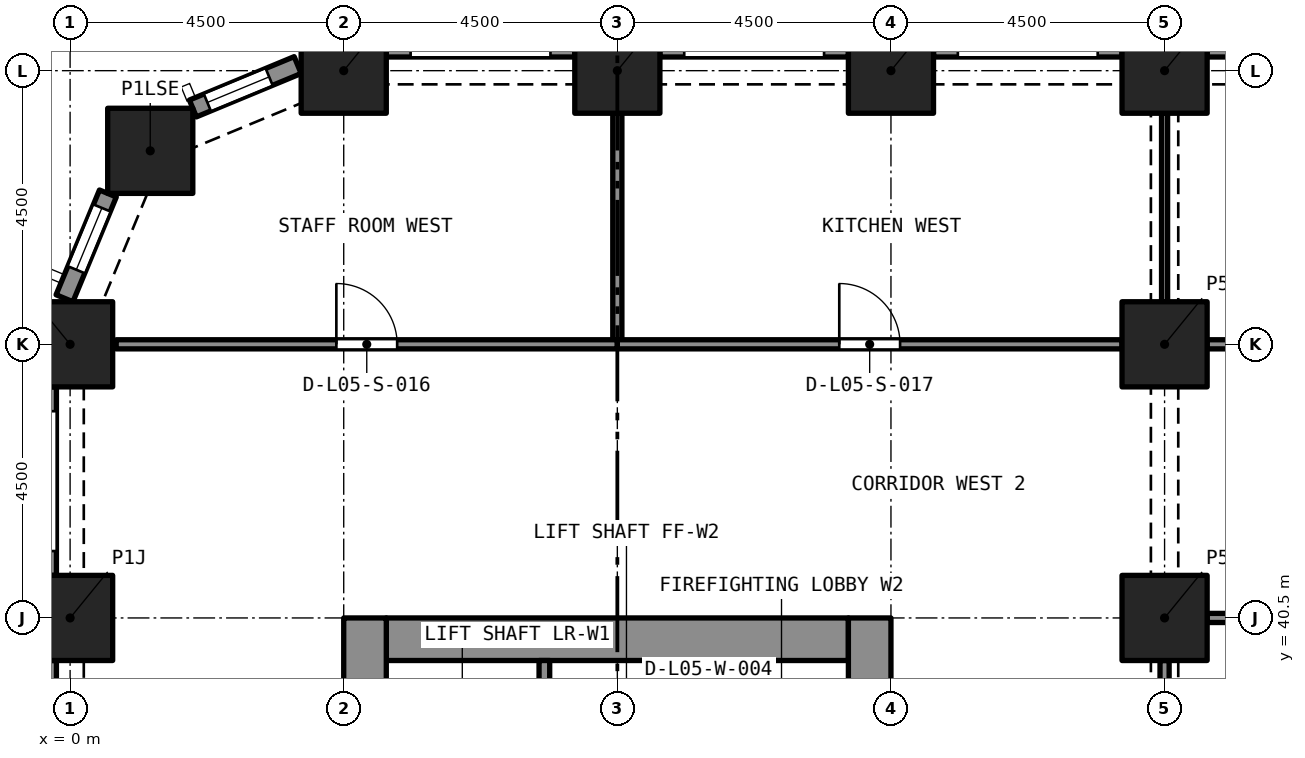
"""IFC4 building model, lengths in metres.
Left out: names, types, materials, properties, quantities, classifications, styles, units other than length and angle.
Written with IfcOpenShell. Run it as: python <this file> out.ifc"""

import sys

from ifc_helpers import new_model, si_unit, direction, frame, frame_2d, origin, origin_2d, place, context, subcontext, project, spatial, rectangle, extrude, element, fill, save


model = new_model("IFC4")
c1 = context("Model", 3, precision=1e-05, world=origin(), true_north=direction((0.0, 1.0)))
c2 = subcontext(c1, "Body", "Model", "MODEL_VIEW")
j1 = project(units=[si_unit("LENGTHUNIT", "METRE"), si_unit("PLANEANGLEUNIT", "RADIAN")], contexts=[c1])
p1 = place(None, origin())
s1 = spatial("IfcSite", under=j1, at=p1, CompositionType="ELEMENT")
p2 = place(p1, origin())
s2 = spatial("IfcBuilding", under=s1, at=p2, CompositionType="ELEMENT")
p3 = place(p2, frame((0.0, 0.0, 26.0)))
s3 = spatial("IfcBuildingStorey", under=s2, at=p3, CompositionType="ELEMENT", Elevation=26.0)
for number, where, z_axis, x_axis in (
    (1, (0.0, 40.5, 0.0), (0.0, 0.0, 1.0), (1.0, 0.0, 0.0)),
    (2, (18.0, 40.5, 0.0), (0.0, 0.0, 1.0), (1.0, 0.0, 0.0)),
    (3, (0.0, 45.0, 0.0), (0.0, 0.0, 1.0), (1.0, 0.0, 0.0)),
    (4, (18.0, 45.0, 0.0), (0.0, 0.0, 1.0), (1.0, 0.0, 0.0)),
    (5, (1.318, 48.182, 0.0), (0.0, 0.0, 1.0), (1.0, 0.0, 0.0)),
    (6, (4.5, 49.5, 0.0), (0.0, 0.0, 1.0), (1.0, 0.0, 0.0)),
    (7, (9.0, 49.5, 0.0), (0.0, 0.0, 1.0), (1.0, 0.0, 0.0)),
    (8, (13.5, 49.5, 0.0), (0.0, 0.0, 1.0), (1.0, 0.0, 0.0)),
    (9, (18.0, 49.5, 0.0), (0.0, 0.0, 1.0), (1.0, 0.0, 0.0)),
):
    element("IfcColumn", number, at=place(p3, frame(where, z_axis=z_axis, x_axis=x_axis)), inside=s3, PredefinedType="COLUMN", context=c2, shape_type="SweptSolid", body=[
        extrude(rectangle(XDim=1.4, YDim=1.4, at=origin_2d()), origin(), (0.0, 0.0, 1.0), 4.4),
    ])
p4 = place(p3, frame((5.2, 40.15, 0.0), z_axis=(0.0, 0.0, 1.0), x_axis=(1.0, 0.0, 0.0)))
e10 = element("IfcWall", 10, at=p4, inside=s3, PredefinedType="SOLIDWALL", context=c2, shape_type="SweptSolid", body=[
    extrude(rectangle(XDim=7.6, YDim=0.7, at=frame_2d((3.8, 0.0))), origin(), (0.0, 0.0, 1.0), 4.4),
])
p5 = place(p3, frame((4.85, 27.0, 0.0), z_axis=(0.0, 0.0, 1.0), x_axis=(0.0, 1.0, 0.0)))
e11 = element("IfcWall", 11, at=p5, inside=s3, PredefinedType="SOLIDWALL", context=c2, shape_type="SweptSolid", body=[
    extrude(rectangle(XDim=13.5, YDim=0.7, at=frame_2d((6.75, 0.0))), origin(), (0.0, 0.0, 1.0), 4.4),
])
p6 = place(p5, frame((8.95, 0.0, 0.0)))
e12 = element("IfcOpeningElement", 12, at=p6, cuts=e11, PredefinedType="OPENING", context=c2, shape_type="SweptSolid", body=[
    extrude(rectangle(XDim=1.2, YDim=2.1, at=frame_2d((0.6, 1.05))), frame((0.0, 0.36, 0.0), z_axis=(0.0, -1.0, 0.0), x_axis=(1.0, 0.0, 0.0)), (0.0, 0.0, 1.0), 0.72),
])
p7 = place(p3, frame((13.15, 27.0, 0.0), z_axis=(0.0, 0.0, 1.0), x_axis=(0.0, 1.0, 0.0)))
e13 = element("IfcWall", 13, at=p7, inside=s3, PredefinedType="SOLIDWALL", context=c2, shape_type="SweptSolid", body=[
    extrude(rectangle(XDim=13.5, YDim=0.7, at=frame_2d((6.75, 0.0))), origin(), (0.0, 0.0, 1.0), 4.4),
])
p8 = place(p7, frame((11.1, 0.0, 0.0)))
e14 = element("IfcOpeningElement", 14, at=p8, cuts=e13, PredefinedType="OPENING", context=c2, shape_type="SweptSolid", body=[
    extrude(rectangle(XDim=1.1, YDim=2.1, at=frame_2d((0.55, 1.05))), frame((0.0, 0.36, 0.0), z_axis=(0.0, -1.0, 0.0), x_axis=(1.0, 0.0, 0.0)), (0.0, 0.0, 1.0), 0.72),
])
p9 = place(p7, frame((8.95, 0.0, 0.0)))
e15 = element("IfcOpeningElement", 15, at=p9, cuts=e13, PredefinedType="OPENING", context=c2, shape_type="SweptSolid", body=[
    extrude(rectangle(XDim=1.2, YDim=2.1, at=frame_2d((0.6, 1.05))), frame((0.0, 0.36, 0.0), z_axis=(0.0, -1.0, 0.0), x_axis=(1.0, 0.0, 0.0)), (0.0, 0.0, 1.0), 0.72),
])
p10 = place(p3, frame((18.7, 49.875, 0.0), z_axis=(0.0, 0.0, 1.0), x_axis=(1.0, 0.0, 0.0)))
e16 = element("IfcWall", 16, at=p10, inside=s3, PredefinedType="SOLIDWALL", context=c2, shape_type="SweptSolid", body=[
    extrude(rectangle(XDim=3.1, YDim=0.3, at=frame_2d((1.55, 0.0))), origin(), (0.0, 0.0, 1.0), 4.4),
])
p11 = place(p10, frame((0.4, 0.0, 0.45)))
e17 = element("IfcOpeningElement", 17, at=p11, cuts=e16, PredefinedType="OPENING", context=c2, shape_type="SweptSolid", body=[
    extrude(rectangle(XDim=2.3, YDim=2.55, at=frame_2d((1.15, 1.275))), frame((0.0, 0.16, 0.0), z_axis=(0.0, -1.0, 0.0), x_axis=(1.0, 0.0, 0.0)), (0.0, 0.0, 1.0), 0.32),
])
p12 = place(p3, frame((14.2, 49.875, 0.0), z_axis=(0.0, 0.0, 1.0), x_axis=(1.0, 0.0, 0.0)))
e18 = element("IfcWall", 18, at=p12, inside=s3, PredefinedType="SOLIDWALL", context=c2, shape_type="SweptSolid", body=[
    extrude(rectangle(XDim=3.1, YDim=0.3, at=frame_2d((1.55, 0.0))), origin(), (0.0, 0.0, 1.0), 4.4),
])
p13 = place(p12, frame((0.4, 0.0, 0.45)))
e19 = element("IfcOpeningElement", 19, at=p13, cuts=e18, PredefinedType="OPENING", context=c2, shape_type="SweptSolid", body=[
    extrude(rectangle(XDim=2.3, YDim=2.55, at=frame_2d((1.15, 1.275))), frame((0.0, 0.16, 0.0), z_axis=(0.0, -1.0, 0.0), x_axis=(1.0, 0.0, 0.0)), (0.0, 0.0, 1.0), 0.32),
])
p14 = place(p3, frame((9.7, 49.875, 0.0), z_axis=(0.0, 0.0, 1.0), x_axis=(1.0, 0.0, 0.0)))
e20 = element("IfcWall", 20, at=p14, inside=s3, PredefinedType="SOLIDWALL", context=c2, shape_type="SweptSolid", body=[
    extrude(rectangle(XDim=3.1, YDim=0.3, at=frame_2d((1.55, 0.0))), origin(), (0.0, 0.0, 1.0), 4.4),
])
p15 = place(p14, frame((0.4, 0.0, 0.45)))
e21 = element("IfcOpeningElement", 21, at=p15, cuts=e20, PredefinedType="OPENING", context=c2, shape_type="SweptSolid", body=[
    extrude(rectangle(XDim=2.3, YDim=2.55, at=frame_2d((1.15, 1.275))), frame((0.0, 0.16, 0.0), z_axis=(0.0, -1.0, 0.0), x_axis=(1.0, 0.0, 0.0)), (0.0, 0.0, 1.0), 0.32),
])
p16 = place(p3, frame((5.2, 49.875, 0.0), z_axis=(0.0, 0.0, 1.0), x_axis=(1.0, 0.0, 0.0)))
e22 = element("IfcWall", 22, at=p16, inside=s3, PredefinedType="SOLIDWALL", context=c2, shape_type="SweptSolid", body=[
    extrude(rectangle(XDim=3.1, YDim=0.3, at=frame_2d((1.55, 0.0))), origin(), (0.0, 0.0, 1.0), 4.4),
])
p17 = place(p16, frame((0.4, 0.0, 0.45)))
e23 = element("IfcOpeningElement", 23, at=p17, cuts=e22, PredefinedType="OPENING", context=c2, shape_type="SweptSolid", body=[
    extrude(rectangle(XDim=2.3, YDim=2.55, at=frame_2d((1.15, 1.275))), frame((0.0, 0.16, 0.0), z_axis=(0.0, -1.0, 0.0), x_axis=(1.0, 0.0, 0.0)), (0.0, 0.0, 1.0), 0.32),
])
p18 = place(p3, frame((2.02, 48.878, 0.0), z_axis=(0.0, 0.0, 1.0), x_axis=(0.923903565336, 0.38262540684, 0.0)))
e24 = element("IfcWall", 24, at=p18, inside=s3, PredefinedType="SOLIDWALL", context=c2, shape_type="SweptSolid", body=[
    extrude(rectangle(XDim=1.865, YDim=0.3, at=frame_2d((0.933, 0.0))), origin(), (0.0, 0.0, 1.0), 4.4),
])
p19 = place(p18, frame((0.258, 0.0, 0.45)))
e25 = element("IfcOpeningElement", 25, at=p19, cuts=e24, PredefinedType="OPENING", context=c2, shape_type="SweptSolid", body=[
    extrude(rectangle(XDim=1.1, YDim=2.55, at=frame_2d((0.55, 1.275))), frame((0.0, 0.16, 0.0), z_axis=(0.0, -1.0, 0.0), x_axis=(1.0, 0.0, 0.0)), (0.0, 0.0, 1.0), 0.32),
])
p20 = place(p3, frame((-0.092, 45.757, 0.0), z_axis=(0.0, 0.0, 1.0), x_axis=(0.382737135771, 0.923857286003, 0.0)))
e26 = element("IfcWall", 26, at=p20, inside=s3, PredefinedType="SOLIDWALL", context=c2, shape_type="SweptSolid", body=[
    extrude(rectangle(XDim=1.865, YDim=0.3, at=frame_2d((0.933, 0.0))), origin(), (0.0, 0.0, 1.0), 4.4),
])
p21 = place(p20, frame((0.508, 0.0, 0.45)))
e27 = element("IfcOpeningElement", 27, at=p21, cuts=e26, PredefinedType="OPENING", context=c2, shape_type="SweptSolid", body=[
    extrude(rectangle(XDim=1.1, YDim=2.55, at=frame_2d((0.55, 1.275))), frame((0.0, 0.16, 0.0), z_axis=(0.0, -1.0, 0.0), x_axis=(1.0, 0.0, 0.0)), (0.0, 0.0, 1.0), 0.32),
])
p22 = place(p3, frame((-0.375, 41.2, 0.0), z_axis=(0.0, 0.0, 1.0), x_axis=(0.0, 1.0, 0.0)))
e28 = element("IfcWall", 28, at=p22, inside=s3, PredefinedType="SOLIDWALL", context=c2, shape_type="SweptSolid", body=[
    extrude(rectangle(XDim=3.1, YDim=0.3, at=frame_2d((1.55, 0.0))), origin(), (0.0, 0.0, 1.0), 4.4),
])
p23 = place(p22, frame((0.4, 0.0, 0.45)))
e29 = element("IfcOpeningElement", 29, at=p23, cuts=e28, PredefinedType="OPENING", context=c2, shape_type="SweptSolid", body=[
    extrude(rectangle(XDim=2.3, YDim=2.55, at=frame_2d((1.15, 1.275))), frame((0.0, 0.16, 0.0), z_axis=(0.0, -1.0, 0.0), x_axis=(1.0, 0.0, 0.0)), (0.0, 0.0, 1.0), 0.32),
])
p24 = place(p3, frame((-0.375, 36.7, 0.0), z_axis=(0.0, 0.0, 1.0), x_axis=(0.0, 1.0, 0.0)))
e30 = element("IfcWall", 30, at=p24, inside=s3, PredefinedType="SOLIDWALL", context=c2, shape_type="SweptSolid", body=[
    extrude(rectangle(XDim=3.1, YDim=0.3, at=frame_2d((1.55, 0.0))), origin(), (0.0, 0.0, 1.0), 4.4),
])
p25 = place(p24, frame((0.4, 0.0, 0.45)))
e31 = element("IfcOpeningElement", 31, at=p25, cuts=e30, PredefinedType="OPENING", context=c2, shape_type="SweptSolid", body=[
    extrude(rectangle(XDim=2.3, YDim=2.55, at=frame_2d((1.15, 1.275))), frame((0.0, 0.16, 0.0), z_axis=(0.0, -1.0, 0.0), x_axis=(1.0, 0.0, 0.0)), (0.0, 0.0, 1.0), 0.32),
])
p26 = place(p3, frame((7.8, 37.5, 0.0), z_axis=(0.0, 0.0, 1.0), x_axis=(0.0, 1.0, 0.0)))
e32 = element("IfcWall", 32, at=p26, inside=s3, PredefinedType="SOLIDWALL", context=c2, shape_type="SweptSolid", body=[
    extrude(rectangle(XDim=2.3, YDim=0.175, at=frame_2d((1.15, 0.0))), origin(), (0.0, 0.0, 1.0), 4.1),
])
p27 = place(p3, frame((10.5, 37.5, 0.0), z_axis=(0.0, 0.0, 1.0), x_axis=(0.0, 1.0, 0.0)))
e33 = element("IfcWall", 33, at=p27, inside=s3, PredefinedType="SOLIDWALL", context=c2, shape_type="SweptSolid", body=[
    extrude(rectangle(XDim=2.3, YDim=0.175, at=frame_2d((1.15, 0.0))), origin(), (0.0, 0.0, 1.0), 4.1),
])
p28 = place(p27, frame((0.65, 0.0, 0.0)))
e34 = element("IfcOpeningElement", 34, at=p28, cuts=e33, PredefinedType="OPENING", context=c2, shape_type="SweptSolid", body=[
    extrude(rectangle(XDim=1.0, YDim=2.1, at=frame_2d((0.5, 1.05))), frame((0.0, 0.097, 0.0), z_axis=(0.0, -1.0, 0.0), x_axis=(1.0, 0.0, 0.0)), (0.0, 0.0, 1.0), 0.195),
])
p29 = place(p3, frame((18.7, 40.5, 0.0), z_axis=(0.0, 0.0, 1.0), x_axis=(1.0, 0.0, 0.0)))
e35 = element("IfcWall", 35, at=p29, inside=s3, PredefinedType="PARTITIONING", context=c2, shape_type="SweptSolid", body=[
    extrude(rectangle(XDim=12.1, YDim=0.15, at=frame_2d((6.05, 0.0))), origin(), (0.0, 0.0, 1.0), 3.95),
])
p30 = place(p3, frame((18.0, 36.7, 0.0), z_axis=(0.0, 0.0, 1.0), x_axis=(0.0, 1.0, 0.0)))
e36 = element("IfcWall", 36, at=p30, inside=s3, PredefinedType="PARTITIONING", context=c2, shape_type="SweptSolid", body=[
    extrude(rectangle(XDim=3.1, YDim=0.15, at=frame_2d((1.55, 0.0))), origin(), (0.0, 0.0, 1.0), 3.58),
])
p31 = place(p3, frame((18.7, 45.0, 0.0), z_axis=(0.0, 0.0, 1.0), x_axis=(1.0, 0.0, 0.0)))
e37 = element("IfcWall", 37, at=p31, inside=s3, PredefinedType="PARTITIONING", context=c2, shape_type="SweptSolid", body=[
    extrude(rectangle(XDim=8.3, YDim=0.15, at=frame_2d((4.15, 0.0))), origin(), (0.0, 0.0, 1.0), 3.95),
])
p32 = place(p31, frame((3.65, 0.0, 0.0)))
e38 = element("IfcOpeningElement", 38, at=p32, cuts=e37, PredefinedType="OPENING", context=c2, shape_type="SweptSolid", body=[
    extrude(rectangle(XDim=1.0, YDim=2.1, at=frame_2d((0.5, 1.05))), frame((0.0, 0.085, 0.0), z_axis=(0.0, -1.0, 0.0), x_axis=(1.0, 0.0, 0.0)), (0.0, 0.0, 1.0), 0.17),
])
p33 = place(p3, frame((18.0, 45.7, 0.0), z_axis=(0.0, 0.0, 1.0), x_axis=(0.0, 1.0, 0.0)))
e39 = element("IfcWall", 39, at=p33, inside=s3, PredefinedType="PARTITIONING", context=c2, shape_type="SweptSolid", body=[
    extrude(rectangle(XDim=3.1, YDim=0.1, at=frame_2d((1.55, 0.0))), origin(), (0.0, 0.0, 1.0), 3.58),
])
p34 = place(p3, frame((9.0, 45.075, 0.0), z_axis=(0.0, 0.0, 1.0), x_axis=(0.0, 1.0, 0.0)))
e40 = element("IfcWall", 40, at=p34, inside=s3, PredefinedType="PARTITIONING", context=c2, shape_type="SweptSolid", body=[
    extrude(rectangle(XDim=3.725, YDim=0.15, at=frame_2d((1.863, 0.0))), origin(), (0.0, 0.0, 1.0), 4.1),
])
p35 = place(p3, frame((0.758, 45.0, 0.0), z_axis=(0.0, 0.0, 1.0), x_axis=(1.0, 0.0, 0.0)))
e41 = element("IfcWall", 41, at=p35, inside=s3, PredefinedType="PARTITIONING", context=c2, shape_type="SweptSolid", body=[
    extrude(rectangle(XDim=8.242, YDim=0.15, at=frame_2d((4.121, 0.0))), origin(), (0.0, 0.0, 1.0), 4.1),
])
p36 = place(p35, frame((3.621, 0.0, 0.0)))
e42 = element("IfcOpeningElement", 42, at=p36, cuts=e41, PredefinedType="OPENING", context=c2, shape_type="SweptSolid", body=[
    extrude(rectangle(XDim=1.0, YDim=2.1, at=frame_2d((0.5, 1.05))), frame((0.0, 0.085, 0.0), z_axis=(0.0, -1.0, 0.0), x_axis=(1.0, 0.0, 0.0)), (0.0, 0.0, 1.0), 0.17),
])
p37 = place(p3, frame((9.0, 45.0, 0.0), z_axis=(0.0, 0.0, 1.0), x_axis=(1.0, 0.0, 0.0)))
e43 = element("IfcWall", 43, at=p37, inside=s3, PredefinedType="PARTITIONING", context=c2, shape_type="SweptSolid", body=[
    extrude(rectangle(XDim=8.3, YDim=0.15, at=frame_2d((4.15, 0.0))), origin(), (0.0, 0.0, 1.0), 4.1),
])
p38 = place(p37, frame((3.65, 0.0, 0.0)))
e44 = element("IfcOpeningElement", 44, at=p38, cuts=e43, PredefinedType="OPENING", context=c2, shape_type="SweptSolid", body=[
    extrude(rectangle(XDim=1.0, YDim=2.1, at=frame_2d((0.5, 1.05))), frame((0.0, 0.085, 0.0), z_axis=(0.0, -1.0, 0.0), x_axis=(1.0, 0.0, 0.0)), (0.0, 0.0, 1.0), 0.17),
])
p39 = place(p19, origin())
e45 = element("IfcWindow", 45, at=p39, inside=s3, PartitioningType="SINGLE_PANEL", PredefinedType="WINDOW", context=c2, shape_type="SweptSolid", body=[
    extrude(rectangle(XDim=1.1, YDim=2.55, at=frame_2d((0.55, 1.275))), frame((0.0, 0.03, 0.0), z_axis=(0.0, -1.0, 0.0), x_axis=(1.0, 0.0, 0.0)), (0.0, 0.0, 1.0), 0.06),
])
fill(e25, e45)
p40 = place(p21, origin())
e46 = element("IfcWindow", 46, at=p40, inside=s3, PartitioningType="SINGLE_PANEL", PredefinedType="WINDOW", context=c2, shape_type="SweptSolid", body=[
    extrude(rectangle(XDim=1.1, YDim=2.55, at=frame_2d((0.55, 1.275))), frame((0.0, 0.03, 0.0), z_axis=(0.0, -1.0, 0.0), x_axis=(1.0, 0.0, 0.0)), (0.0, 0.0, 1.0), 0.06),
])
fill(e27, e46)
p41 = place(p36, origin())
e47 = element("IfcDoor", 47, at=p41, inside=s3, OperationType="SINGLE_SWING_RIGHT", PredefinedType="DOOR", context=c2, shape_type="SweptSolid", body=[
    extrude(rectangle(XDim=1.0, YDim=2.1, at=frame_2d((0.5, 1.05))), frame((0.0, 0.025, 0.0), z_axis=(0.0, -1.0, 0.0), x_axis=(1.0, 0.0, 0.0)), (0.0, 0.0, 1.0), 0.05),
])
fill(e42, e47)
p42 = place(p38, origin())
e48 = element("IfcDoor", 48, at=p42, inside=s3, OperationType="SINGLE_SWING_RIGHT", PredefinedType="DOOR", context=c2, shape_type="SweptSolid", body=[
    extrude(rectangle(XDim=1.0, YDim=2.1, at=frame_2d((0.5, 1.05))), frame((0.0, 0.025, 0.0), z_axis=(0.0, -1.0, 0.0), x_axis=(1.0, 0.0, 0.0)), (0.0, 0.0, 1.0), 0.05),
])
fill(e44, e48)
save(model, sys.argv[1])
